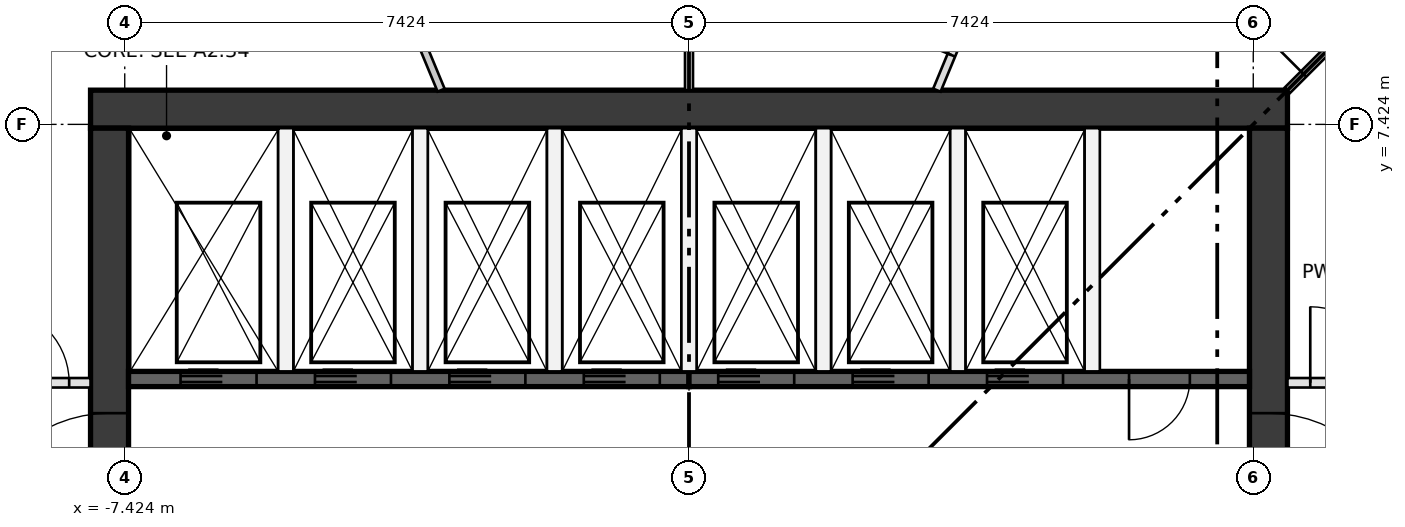
"""IFC4 building model, lengths in metres.
Left out: names, types, materials, properties, quantities, classifications, styles, units other than length and angle.
Written with IfcOpenShell. Run it as: python <this file> out.ifc"""

import sys

from ifc_helpers import new_model, si_unit, direction, frame, frame_2d, origin, place, context, subcontext, project, spatial, rectangle, extrude, element, fill, save


model = new_model("IFC4")
c1 = context("Model", 3, precision=1e-05, world=origin(), true_north=direction((0.0, 1.0)))
c2 = subcontext(c1, "Body", "Model", "MODEL_VIEW")
j1 = project(units=[si_unit("LENGTHUNIT", "METRE"), si_unit("PLANEANGLEUNIT", "RADIAN")], contexts=[c1])
p1 = place(None, origin())
s1 = spatial("IfcSite", under=j1, at=p1, CompositionType="ELEMENT")
p2 = place(p1, origin())
s2 = spatial("IfcBuilding", under=s1, at=p2, CompositionType="ELEMENT")
p3 = place(p2, frame((0.0, 0.0, 211.1)))
s3 = spatial("IfcBuildingStorey", under=s2, at=p3, CompositionType="ELEMENT", Elevation=211.1)
p4 = place(p3, frame((-7.874, 7.624, 0.0), z_axis=(0.0, 0.0, 1.0), x_axis=(1.0, 0.0, 0.0)))
e1 = element("IfcWall", 1, at=p4, inside=s3, PredefinedType="SHEAR", context=c2, shape_type="SweptSolid", body=[
    extrude(rectangle(XDim=15.748, YDim=0.5, at=frame_2d((7.874, 0.0))), origin(), (0.0, 0.0, 1.0), 3.35),
])
p5 = place(p3, frame((-7.624, -7.374, 0.0), z_axis=(0.0, 0.0, 1.0), x_axis=(0.0, 1.0, 0.0)))
e2 = element("IfcWall", 2, at=p5, inside=s3, PredefinedType="SHEAR", context=c2, shape_type="SweptSolid", body=[
    extrude(rectangle(XDim=14.748, YDim=0.5, at=frame_2d((7.374, 0.0))), origin(), (0.0, 0.0, 1.0), 3.35),
])
p6 = place(p5, frame((6.874, 0.0, 0.0)))
e3 = element("IfcOpeningElement", 3, at=p6, cuts=e2, PredefinedType="OPENING", context=c2, shape_type="SweptSolid", body=[
    extrude(rectangle(XDim=1.0, YDim=2.1, at=frame_2d((0.5, 1.05))), frame((0.0, 0.26, 0.0), z_axis=(0.0, -1.0, 0.0), x_axis=(1.0, 0.0, 0.0)), (0.0, 0.0, 1.0), 0.52),
])
p7 = place(p5, frame((3.75, 0.0, 0.0)))
e4 = element("IfcOpeningElement", 4, at=p7, cuts=e2, PredefinedType="OPENING", context=c2, shape_type="SweptSolid", body=[
    extrude(rectangle(XDim=1.8, YDim=2.1, at=frame_2d((0.9, 1.05))), frame((0.0, 0.26, 0.0), z_axis=(0.0, -1.0, 0.0), x_axis=(1.0, 0.0, 0.0)), (0.0, 0.0, 1.0), 0.52),
])
p8 = place(p5, frame((9.198, 0.0, 0.0)))
e5 = element("IfcOpeningElement", 5, at=p8, cuts=e2, PredefinedType="OPENING", context=c2, shape_type="SweptSolid", body=[
    extrude(rectangle(XDim=1.8, YDim=2.1, at=frame_2d((0.9, 1.05))), frame((0.0, 0.26, 0.0), z_axis=(0.0, -1.0, 0.0), x_axis=(1.0, 0.0, 0.0)), (0.0, 0.0, 1.0), 0.52),
])
p9 = place(p3, frame((7.624, -7.374, 0.0), z_axis=(0.0, 0.0, 1.0), x_axis=(0.0, 1.0, 0.0)))
e6 = element("IfcWall", 6, at=p9, inside=s3, PredefinedType="SHEAR", context=c2, shape_type="SweptSolid", body=[
    extrude(rectangle(XDim=14.748, YDim=0.5, at=frame_2d((7.374, 0.0))), origin(), (0.0, 0.0, 1.0), 3.35),
])
p10 = place(p9, frame((6.874, 0.0, 0.0)))
e7 = element("IfcOpeningElement", 7, at=p10, cuts=e6, PredefinedType="OPENING", context=c2, shape_type="SweptSolid", body=[
    extrude(rectangle(XDim=1.0, YDim=2.1, at=frame_2d((0.5, 1.05))), frame((0.0, 0.26, 0.0), z_axis=(0.0, -1.0, 0.0), x_axis=(1.0, 0.0, 0.0)), (0.0, 0.0, 1.0), 0.52),
])
p11 = place(p9, frame((3.75, 0.0, 0.0)))
e8 = element("IfcOpeningElement", 8, at=p11, cuts=e6, PredefinedType="OPENING", context=c2, shape_type="SweptSolid", body=[
    extrude(rectangle(XDim=1.8, YDim=2.1, at=frame_2d((0.9, 1.05))), frame((0.0, 0.26, 0.0), z_axis=(0.0, -1.0, 0.0), x_axis=(1.0, 0.0, 0.0)), (0.0, 0.0, 1.0), 0.52),
])
p12 = place(p9, frame((9.198, 0.0, 0.0)))
e9 = element("IfcOpeningElement", 9, at=p12, cuts=e6, PredefinedType="OPENING", context=c2, shape_type="SweptSolid", body=[
    extrude(rectangle(XDim=1.8, YDim=2.1, at=frame_2d((0.9, 1.05))), frame((0.0, 0.26, 0.0), z_axis=(0.0, -1.0, 0.0), x_axis=(1.0, 0.0, 0.0)), (0.0, 0.0, 1.0), 0.52),
])
p13 = place(p3, frame((-7.374, 4.074, 0.0), z_axis=(0.0, 0.0, 1.0), x_axis=(1.0, 0.0, 0.0)))
e10 = element("IfcWall", 10, at=p13, inside=s3, PredefinedType="SHEAR", context=c2, shape_type="SweptSolid", body=[
    extrude(rectangle(XDim=7.374, YDim=0.2, at=frame_2d((3.687, 0.0))), origin(), (0.0, 0.0, 1.0), 3.0),
])
p14 = place(p13, frame((0.684, 0.0, 0.0)))
e11 = element("IfcOpeningElement", 11, at=p14, cuts=e10, PredefinedType="OPENING", context=c2, shape_type="SweptSolid", body=[
    extrude(rectangle(XDim=1.0, YDim=2.1, at=frame_2d((0.5, 1.05))), frame((0.0, 0.11, 0.0), z_axis=(0.0, -1.0, 0.0), x_axis=(1.0, 0.0, 0.0)), (0.0, 0.0, 1.0), 0.22),
])
p15 = place(p13, frame((2.453, 0.0, 0.0)))
e12 = element("IfcOpeningElement", 12, at=p15, cuts=e10, PredefinedType="OPENING", context=c2, shape_type="SweptSolid", body=[
    extrude(rectangle(XDim=1.0, YDim=2.1, at=frame_2d((0.5, 1.05))), frame((0.0, 0.11, 0.0), z_axis=(0.0, -1.0, 0.0), x_axis=(1.0, 0.0, 0.0)), (0.0, 0.0, 1.0), 0.22),
])
p16 = place(p13, frame((4.221, 0.0, 0.0)))
e13 = element("IfcOpeningElement", 13, at=p16, cuts=e10, PredefinedType="OPENING", context=c2, shape_type="SweptSolid", body=[
    extrude(rectangle(XDim=1.0, YDim=2.1, at=frame_2d((0.5, 1.05))), frame((0.0, 0.11, 0.0), z_axis=(0.0, -1.0, 0.0), x_axis=(1.0, 0.0, 0.0)), (0.0, 0.0, 1.0), 0.22),
])
p17 = place(p13, frame((5.99, 0.0, 0.0)))
e14 = element("IfcOpeningElement", 14, at=p17, cuts=e10, PredefinedType="OPENING", context=c2, shape_type="SweptSolid", body=[
    extrude(rectangle(XDim=1.0, YDim=2.1, at=frame_2d((0.5, 1.05))), frame((0.0, 0.11, 0.0), z_axis=(0.0, -1.0, 0.0), x_axis=(1.0, 0.0, 0.0)), (0.0, 0.0, 1.0), 0.22),
])
p18 = place(p3, frame((0.0, 4.074, 0.0), z_axis=(0.0, 0.0, 1.0), x_axis=(1.0, 0.0, 0.0)))
e15 = element("IfcWall", 15, at=p18, inside=s3, PredefinedType="SHEAR", context=c2, shape_type="SweptSolid", body=[
    extrude(rectangle(XDim=7.374, YDim=0.2, at=frame_2d((3.687, 0.0))), origin(), (0.0, 0.0, 1.0), 3.0),
])
p19 = place(p18, frame((0.384, 0.0, 0.0)))
e16 = element("IfcOpeningElement", 16, at=p19, cuts=e15, PredefinedType="OPENING", context=c2, shape_type="SweptSolid", body=[
    extrude(rectangle(XDim=1.0, YDim=2.1, at=frame_2d((0.5, 1.05))), frame((0.0, 0.11, 0.0), z_axis=(0.0, -1.0, 0.0), x_axis=(1.0, 0.0, 0.0)), (0.0, 0.0, 1.0), 0.22),
])
p20 = place(p18, frame((2.153, 0.0, 0.0)))
e17 = element("IfcOpeningElement", 17, at=p20, cuts=e15, PredefinedType="OPENING", context=c2, shape_type="SweptSolid", body=[
    extrude(rectangle(XDim=1.0, YDim=2.1, at=frame_2d((0.5, 1.05))), frame((0.0, 0.11, 0.0), z_axis=(0.0, -1.0, 0.0), x_axis=(1.0, 0.0, 0.0)), (0.0, 0.0, 1.0), 0.22),
])
p21 = place(p18, frame((3.921, 0.0, 0.0)))
e18 = element("IfcOpeningElement", 18, at=p21, cuts=e15, PredefinedType="OPENING", context=c2, shape_type="SweptSolid", body=[
    extrude(rectangle(XDim=1.0, YDim=2.1, at=frame_2d((0.5, 1.05))), frame((0.0, 0.11, 0.0), z_axis=(0.0, -1.0, 0.0), x_axis=(1.0, 0.0, 0.0)), (0.0, 0.0, 1.0), 0.22),
])
p22 = place(p18, frame((5.79, 0.0, 0.0)))
e19 = element("IfcOpeningElement", 19, at=p22, cuts=e15, PredefinedType="OPENING", context=c2, shape_type="SweptSolid", body=[
    extrude(rectangle(XDim=0.8, YDim=2.1, at=frame_2d((0.4, 1.05))), frame((0.0, 0.11, 0.0), z_axis=(0.0, -1.0, 0.0), x_axis=(1.0, 0.0, 0.0)), (0.0, 0.0, 1.0), 0.22),
])
for number, where, z_axis, x_axis in (
    (20, (-5.305, 4.174, 0.0), (0.0, 0.0, 1.0), (0.0, 1.0, 0.0)),
    (21, (-3.537, 4.174, 0.0), (0.0, 0.0, 1.0), (0.0, 1.0, 0.0)),
    (22, (-1.769, 4.174, 0.0), (0.0, 0.0, 1.0), (0.0, 1.0, 0.0)),
    (23, (0.0, 4.174, 0.0), (0.0, 0.0, 1.0), (0.0, 1.0, 0.0)),
    (24, (1.769, 4.174, 0.0), (0.0, 0.0, 1.0), (0.0, 1.0, 0.0)),
    (25, (3.537, 4.174, 0.0), (0.0, 0.0, 1.0), (0.0, 1.0, 0.0)),
    (26, (5.305, 4.174, 0.0), (0.0, 0.0, 1.0), (0.0, 1.0, 0.0)),
):
    element("IfcWall", number, at=place(p3, frame(where, z_axis=z_axis, x_axis=x_axis)), inside=s3, PredefinedType="PARTITIONING", context=c2, shape_type="SweptSolid", body=[
        extrude(rectangle(XDim=3.2, YDim=0.2, at=frame_2d((1.6, 0.0))), origin(), (0.0, 0.0, 1.0), 3.0),
    ])
p23 = place(p3, frame((7.874, 4.024, 0.0), z_axis=(0.0, 0.0, 1.0), x_axis=(1.0, 0.0, 0.0)))
e27 = element("IfcWall", 27, at=p23, inside=s3, PredefinedType="PARTITIONING", context=c2, shape_type="SweptSolid", body=[
    extrude(rectangle(XDim=2.475, YDim=0.125, at=frame_2d((1.238, 0.0))), origin(), (0.0, 0.0, 1.0), 3.0),
])
p24 = place(p23, frame((0.3, 0.0, 0.0)))
e28 = element("IfcOpeningElement", 28, at=p24, cuts=e27, PredefinedType="OPENING", context=c2, shape_type="SweptSolid", body=[
    extrude(rectangle(XDim=1.0, YDim=2.1, at=frame_2d((0.5, 1.05))), frame((0.0, 0.073, 0.0), z_axis=(0.0, -1.0, 0.0), x_axis=(1.0, 0.0, 0.0)), (0.0, 0.0, 1.0), 0.145),
])
p25 = place(p3, frame((-9.436, 4.024, 0.0), z_axis=(0.0, 0.0, 1.0), x_axis=(1.0, 0.0, 0.0)))
e29 = element("IfcWall", 29, at=p25, inside=s3, PredefinedType="PARTITIONING", context=c2, shape_type="SweptSolid", body=[
    extrude(rectangle(XDim=1.562, YDim=0.125, at=frame_2d((0.781, 0.0))), origin(), (0.0, 0.0, 1.0), 3.0),
])
p26 = place(p25, frame((0.281, 0.0, 0.0)))
e30 = element("IfcOpeningElement", 30, at=p26, cuts=e29, PredefinedType="OPENING", context=c2, shape_type="SweptSolid", body=[
    extrude(rectangle(XDim=1.0, YDim=2.1, at=frame_2d((0.5, 1.05))), frame((0.0, 0.073, 0.0), z_axis=(0.0, -1.0, 0.0), x_axis=(1.0, 0.0, 0.0)), (0.0, 0.0, 1.0), 0.145),
])
p27 = place(p3, frame((7.874, 7.874, 0.0), z_axis=(0.0, 0.0, 1.0), x_axis=(0.707106781187, 0.707106781187, 0.0)))
e31 = element("IfcWall", 31, at=p27, inside=s3, PredefinedType="PARTITIONING", context=c2, shape_type="SweptSolid", body=[
    extrude(rectangle(XDim=4.334, YDim=0.1, at=frame_2d((2.167, 0.0))), origin(), (0.0, 0.0, 1.0), 3.0),
])
p28 = place(p27, frame((0.3, 0.0, 0.0)))
e32 = element("IfcOpeningElement", 32, at=p28, cuts=e31, PredefinedType="OPENING", context=c2, shape_type="SweptSolid", body=[
    extrude(rectangle(XDim=1.0, YDim=2.1, at=frame_2d((0.5, 1.05))), frame((0.0, 0.06, 0.0), z_axis=(0.0, -1.0, 0.0), x_axis=(1.0, 0.0, 0.0)), (0.0, 0.0, 1.0), 0.12),
])
p29 = place(p3, frame((3.261, 7.874, 0.0), z_axis=(0.0, 0.0, 1.0), x_axis=(0.382670108955, 0.923885051136, 0.0)))
e33 = element("IfcWall", 33, at=p29, inside=s3, PredefinedType="PARTITIONING", context=c2, shape_type="SweptSolid", body=[
    extrude(rectangle(XDim=2.077, YDim=0.105, at=frame_2d((1.039, 0.0))), origin(), (0.0, 0.0, 1.0), 3.0),
])
p30 = place(p29, frame((0.5, 0.0, 0.0)))
e34 = element("IfcOpeningElement", 34, at=p30, cuts=e33, PredefinedType="OPENING", context=c2, shape_type="SweptSolid", body=[
    extrude(rectangle(XDim=1.0, YDim=2.1, at=frame_2d((0.5, 1.05))), frame((0.0, 0.062, 0.0), z_axis=(0.0, -1.0, 0.0), x_axis=(1.0, 0.0, 0.0)), (0.0, 0.0, 1.0), 0.125),
])
p31 = place(p3, frame((0.0, 7.874, 0.0), z_axis=(0.0, 0.0, 1.0), x_axis=(0.0, 1.0, 0.0)))
e35 = element("IfcWall", 35, at=p31, inside=s3, PredefinedType="PARTITIONING", context=c2, shape_type="SweptSolid", body=[
    extrude(rectangle(XDim=2.726, YDim=0.105, at=frame_2d((1.363, 0.0))), origin(), (0.0, 0.0, 1.0), 3.0),
])
p32 = place(p3, frame((-4.056, 9.793, 0.0), z_axis=(0.0, 0.0, 1.0), x_axis=(0.382670108955, -0.923885051136, 0.0)))
e36 = element("IfcWall", 36, at=p32, inside=s3, PredefinedType="PARTITIONING", context=c2, shape_type="SweptSolid", body=[
    extrude(rectangle(XDim=2.077, YDim=0.1, at=frame_2d((1.039, 0.0))), origin(), (0.0, 0.0, 1.0), 3.0),
])
p33 = place(p32, frame((0.5, 0.0, 0.0)))
e37 = element("IfcOpeningElement", 37, at=p33, cuts=e36, PredefinedType="OPENING", context=c2, shape_type="SweptSolid", body=[
    extrude(rectangle(XDim=1.0, YDim=2.1, at=frame_2d((0.5, 1.05))), frame((0.0, 0.06, 0.0), z_axis=(0.0, -1.0, 0.0), x_axis=(1.0, 0.0, 0.0)), (0.0, 0.0, 1.0), 0.12),
])
p34 = place(p14, frame((1.0, 0.0, 0.0), z_axis=(0.0, 0.0, 1.0), x_axis=(-1.0, 0.0, 0.0)))
e38 = element("IfcDoor", 38, at=p34, inside=s3, OperationType="DOUBLE_DOOR_SLIDING", PredefinedType="DOOR", context=c2, shape_type="SweptSolid", body=[
    extrude(rectangle(XDim=1.0, YDim=2.1, at=frame_2d((0.5, 1.05))), frame((0.0, 0.025, 0.0), z_axis=(0.0, -1.0, 0.0), x_axis=(1.0, 0.0, 0.0)), (0.0, 0.0, 1.0), 0.05),
])
fill(e11, e38)
p35 = place(p15, frame((1.0, 0.0, 0.0), z_axis=(0.0, 0.0, 1.0), x_axis=(-1.0, 0.0, 0.0)))
e39 = element("IfcDoor", 39, at=p35, inside=s3, OperationType="DOUBLE_DOOR_SLIDING", PredefinedType="DOOR", context=c2, shape_type="SweptSolid", body=[
    extrude(rectangle(XDim=1.0, YDim=2.1, at=frame_2d((0.5, 1.05))), frame((0.0, 0.025, 0.0), z_axis=(0.0, -1.0, 0.0), x_axis=(1.0, 0.0, 0.0)), (0.0, 0.0, 1.0), 0.05),
])
fill(e12, e39)
p36 = place(p16, frame((1.0, 0.0, 0.0), z_axis=(0.0, 0.0, 1.0), x_axis=(-1.0, 0.0, 0.0)))
e40 = element("IfcDoor", 40, at=p36, inside=s3, OperationType="DOUBLE_DOOR_SLIDING", PredefinedType="DOOR", context=c2, shape_type="SweptSolid", body=[
    extrude(rectangle(XDim=1.0, YDim=2.1, at=frame_2d((0.5, 1.05))), frame((0.0, 0.025, 0.0), z_axis=(0.0, -1.0, 0.0), x_axis=(1.0, 0.0, 0.0)), (0.0, 0.0, 1.0), 0.05),
])
fill(e13, e40)
p37 = place(p17, frame((1.0, 0.0, 0.0), z_axis=(0.0, 0.0, 1.0), x_axis=(-1.0, 0.0, 0.0)))
e41 = element("IfcDoor", 41, at=p37, inside=s3, OperationType="DOUBLE_DOOR_SLIDING", PredefinedType="DOOR", context=c2, shape_type="SweptSolid", body=[
    extrude(rectangle(XDim=1.0, YDim=2.1, at=frame_2d((0.5, 1.05))), frame((0.0, 0.025, 0.0), z_axis=(0.0, -1.0, 0.0), x_axis=(1.0, 0.0, 0.0)), (0.0, 0.0, 1.0), 0.05),
])
fill(e14, e41)
p38 = place(p19, frame((1.0, 0.0, 0.0), z_axis=(0.0, 0.0, 1.0), x_axis=(-1.0, 0.0, 0.0)))
e42 = element("IfcDoor", 42, at=p38, inside=s3, OperationType="DOUBLE_DOOR_SLIDING", PredefinedType="DOOR", context=c2, shape_type="SweptSolid", body=[
    extrude(rectangle(XDim=1.0, YDim=2.1, at=frame_2d((0.5, 1.05))), frame((0.0, 0.025, 0.0), z_axis=(0.0, -1.0, 0.0), x_axis=(1.0, 0.0, 0.0)), (0.0, 0.0, 1.0), 0.05),
])
fill(e16, e42)
p39 = place(p20, frame((1.0, 0.0, 0.0), z_axis=(0.0, 0.0, 1.0), x_axis=(-1.0, 0.0, 0.0)))
e43 = element("IfcDoor", 43, at=p39, inside=s3, OperationType="DOUBLE_DOOR_SLIDING", PredefinedType="DOOR", context=c2, shape_type="SweptSolid", body=[
    extrude(rectangle(XDim=1.0, YDim=2.1, at=frame_2d((0.5, 1.05))), frame((0.0, 0.025, 0.0), z_axis=(0.0, -1.0, 0.0), x_axis=(1.0, 0.0, 0.0)), (0.0, 0.0, 1.0), 0.05),
])
fill(e17, e43)
p40 = place(p21, frame((1.0, 0.0, 0.0), z_axis=(0.0, 0.0, 1.0), x_axis=(-1.0, 0.0, 0.0)))
e44 = element("IfcDoor", 44, at=p40, inside=s3, OperationType="DOUBLE_DOOR_SLIDING", PredefinedType="DOOR", context=c2, shape_type="SweptSolid", body=[
    extrude(rectangle(XDim=1.0, YDim=2.1, at=frame_2d((0.5, 1.05))), frame((0.0, 0.025, 0.0), z_axis=(0.0, -1.0, 0.0), x_axis=(1.0, 0.0, 0.0)), (0.0, 0.0, 1.0), 0.05),
])
fill(e18, e44)
p41 = place(p22, frame((0.8, 0.0, 0.0), z_axis=(0.0, 0.0, 1.0), x_axis=(-1.0, 0.0, 0.0)))
e45 = element("IfcDoor", 45, at=p41, inside=s3, OperationType="SINGLE_SWING_LEFT", PredefinedType="DOOR", context=c2, shape_type="SweptSolid", body=[
    extrude(rectangle(XDim=0.8, YDim=2.1, at=frame_2d((0.4, 1.05))), frame((0.0, 0.025, 0.0), z_axis=(0.0, -1.0, 0.0), x_axis=(1.0, 0.0, 0.0)), (0.0, 0.0, 1.0), 0.05),
])
fill(e19, e45)
p42 = place(p8, origin())
e46 = element("IfcDoor", 46, at=p42, inside=s3, OperationType="DOUBLE_DOOR_SINGLE_SWING", PredefinedType="DOOR", context=c2, shape_type="SweptSolid", body=[
    extrude(rectangle(XDim=1.8, YDim=2.1, at=frame_2d((0.9, 1.05))), frame((0.0, 0.025, 0.0), z_axis=(0.0, -1.0, 0.0), x_axis=(1.0, 0.0, 0.0)), (0.0, 0.0, 1.0), 0.05),
])
fill(e5, e46)
p43 = place(p12, frame((1.8, 0.0, 0.0), z_axis=(0.0, 0.0, 1.0), x_axis=(-1.0, 0.0, 0.0)))
e47 = element("IfcDoor", 47, at=p43, inside=s3, OperationType="DOUBLE_DOOR_SINGLE_SWING", PredefinedType="DOOR", context=c2, shape_type="SweptSolid", body=[
    extrude(rectangle(XDim=1.8, YDim=2.1, at=frame_2d((0.9, 1.05))), frame((0.0, 0.025, 0.0), z_axis=(0.0, -1.0, 0.0), x_axis=(1.0, 0.0, 0.0)), (0.0, 0.0, 1.0), 0.05),
])
fill(e9, e47)
p44 = place(p24, origin())
e48 = element("IfcDoor", 48, at=p44, inside=s3, OperationType="SINGLE_SWING_LEFT", PredefinedType="DOOR", context=c2, shape_type="SweptSolid", body=[
    extrude(rectangle(XDim=1.0, YDim=2.1, at=frame_2d((0.5, 1.05))), frame((0.0, 0.025, 0.0), z_axis=(0.0, -1.0, 0.0), x_axis=(1.0, 0.0, 0.0)), (0.0, 0.0, 1.0), 0.05),
])
fill(e28, e48)
p45 = place(p26, origin())
e49 = element("IfcDoor", 49, at=p45, inside=s3, OperationType="SINGLE_SWING_LEFT", PredefinedType="DOOR", context=c2, shape_type="SweptSolid", body=[
    extrude(rectangle(XDim=1.0, YDim=2.1, at=frame_2d((0.5, 1.05))), frame((0.0, 0.025, 0.0), z_axis=(0.0, -1.0, 0.0), x_axis=(1.0, 0.0, 0.0)), (0.0, 0.0, 1.0), 0.05),
])
fill(e30, e49)
p46 = place(p28, origin())
e50 = element("IfcDoor", 50, at=p46, inside=s3, OperationType="SINGLE_SWING_LEFT", PredefinedType="DOOR", context=c2, shape_type="SweptSolid", body=[
    extrude(rectangle(XDim=1.0, YDim=2.1, at=frame_2d((0.5, 1.05))), frame((0.0, 0.025, 0.0), z_axis=(0.0, -1.0, 0.0), x_axis=(1.0, 0.0, 0.0)), (0.0, 0.0, 1.0), 0.05),
])
fill(e32, e50)
p47 = place(p30, origin())
e51 = element("IfcDoor", 51, at=p47, inside=s3, OperationType="SINGLE_SWING_LEFT", PredefinedType="DOOR", context=c2, shape_type="SweptSolid", body=[
    extrude(rectangle(XDim=1.0, YDim=2.1, at=frame_2d((0.5, 1.05))), frame((0.0, 0.025, 0.0), z_axis=(0.0, -1.0, 0.0), x_axis=(1.0, 0.0, 0.0)), (0.0, 0.0, 1.0), 0.05),
])
fill(e34, e51)
save(model, sys.argv[1])
